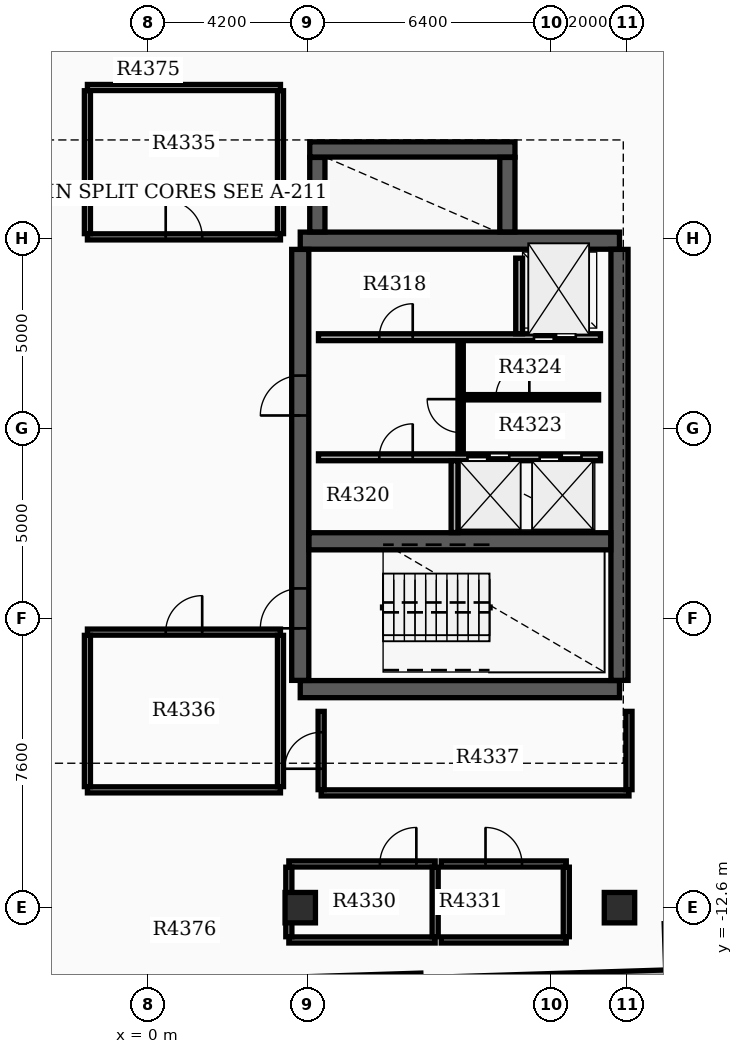
"""IFC4 building model, lengths in metres.
Left out: names, types, materials, properties, quantities, classifications, styles, units other than length and angle.
Written with IfcOpenShell. Run it as: python <this file> out.ifc"""

import sys

from ifc_helpers import new_model, si_unit, direction, frame, frame_2d, origin, origin_2d, place, context, subcontext, project, spatial, rectangle, extrude, element, fill, save


model = new_model("IFC4")
c1 = context("Model", 3, precision=1e-05, world=origin(), true_north=direction((0.0, 1.0)))
c2 = subcontext(c1, "Body", "Model", "MODEL_VIEW")
j1 = project(units=[si_unit("LENGTHUNIT", "METRE"), si_unit("PLANEANGLEUNIT", "RADIAN")], contexts=[c1])
p1 = place(None, origin())
s1 = spatial("IfcSite", under=j1, at=p1, CompositionType="ELEMENT")
p2 = place(p1, origin())
s2 = spatial("IfcBuilding", under=s1, at=p2, CompositionType="ELEMENT")
p3 = place(p2, frame((0.0, 0.0, 273.3)))
s3 = spatial("IfcBuildingStorey", under=s2, at=p3, CompositionType="ELEMENT", Elevation=273.3)
for number, where, z_axis, x_axis in (
    (1, (4.0, -6.85, 0.0), (0.0, 0.0, 1.0), (1.0, 0.0, 0.0)),
    (2, (4.0, 4.95, 0.0), (0.0, 0.0, 1.0), (1.0, 0.0, 0.0)),
):
    element("IfcWall", number, at=place(p3, frame(where, z_axis=z_axis, x_axis=x_axis)), inside=s3, PredefinedType="SHEAR", context=c2, shape_type="SweptSolid", body=[
        extrude(rectangle(XDim=8.4, YDim=0.45, at=frame_2d((4.2, 0.0))), origin(), (0.0, 0.0, 1.0), 3.7),
    ])
p4 = place(p3, frame((4.0, -6.62, 0.0), z_axis=(0.0, 0.0, 1.0), x_axis=(0.0, 1.0, 0.0)))
e3 = element("IfcWall", 3, at=p4, inside=s3, PredefinedType="SHEAR", context=c2, shape_type="SweptSolid", body=[
    extrude(rectangle(XDim=11.34, YDim=0.45, at=frame_2d((5.67, 0.0))), origin(), (0.0, 0.0, 1.0), 3.7),
])
p5 = place(p4, frame((1.37, 0.0, 0.0)))
e4 = element("IfcOpeningElement", 4, at=p5, cuts=e3, PredefinedType="OPENING", context=c2, shape_type="SweptSolid", body=[
    extrude(rectangle(XDim=1.05, YDim=2.15, at=frame_2d((0.525, 1.075))), frame((0.0, 0.235, 0.0), z_axis=(0.0, -1.0, 0.0), x_axis=(1.0, 0.0, 0.0)), (0.0, 0.0, 1.0), 0.47),
])
p6 = place(p4, frame((6.97, 0.0, 0.0)))
e5 = element("IfcOpeningElement", 5, at=p6, cuts=e3, PredefinedType="OPENING", context=c2, shape_type="SweptSolid", body=[
    extrude(rectangle(XDim=1.05, YDim=2.15, at=frame_2d((0.525, 1.075))), frame((0.0, 0.235, 0.0), z_axis=(0.0, -1.0, 0.0), x_axis=(1.0, 0.0, 0.0)), (0.0, 0.0, 1.0), 0.47),
])
p7 = place(p3, frame((12.4, -6.62, 0.0), z_axis=(0.0, 0.0, 1.0), x_axis=(0.0, 1.0, 0.0)))
e6 = element("IfcWall", 6, at=p7, inside=s3, PredefinedType="SHEAR", context=c2, shape_type="SweptSolid", body=[
    extrude(rectangle(XDim=11.34, YDim=0.45, at=frame_2d((5.67, 0.0))), origin(), (0.0, 0.0, 1.0), 3.7),
])
p8 = place(p3, frame((4.23, -2.96, 0.0), z_axis=(0.0, 0.0, 1.0), x_axis=(1.0, 0.0, 0.0)))
e7 = element("IfcWall", 7, at=p8, inside=s3, PredefinedType="SHEAR", context=c2, shape_type="SweptSolid", body=[
    extrude(rectangle(XDim=7.94, YDim=0.45, at=frame_2d((3.97, 0.0))), origin(), (0.0, 0.0, 1.0), 3.7),
])
p9 = place(p3, frame((4.45, 5.18, 0.0), z_axis=(0.0, 0.0, 1.0), x_axis=(0.0, 1.0, 0.0)))
e8 = element("IfcWall", 8, at=p9, inside=s3, PredefinedType="SHEAR", context=c2, shape_type="SweptSolid", body=[
    extrude(rectangle(XDim=1.96, YDim=0.4, at=frame_2d((0.98, 0.0))), origin(), (0.0, 0.0, 1.0), 3.7),
])
p10 = place(p3, frame((4.25, 7.35, 0.0), z_axis=(0.0, 0.0, 1.0), x_axis=(1.0, 0.0, 0.0)))
e9 = element("IfcWall", 9, at=p10, inside=s3, PredefinedType="SHEAR", context=c2, shape_type="SweptSolid", body=[
    extrude(rectangle(XDim=5.4, YDim=0.4, at=frame_2d((2.7, 0.0))), origin(), (0.0, 0.0, 1.0), 3.7),
])
p11 = place(p3, frame((9.45, 5.18, 0.0), z_axis=(0.0, 0.0, 1.0), x_axis=(0.0, 1.0, 0.0)))
e10 = element("IfcWall", 10, at=p11, inside=s3, PredefinedType="SHEAR", context=c2, shape_type="SweptSolid", body=[
    extrude(rectangle(XDim=1.96, YDim=0.4, at=frame_2d((0.98, 0.0))), origin(), (0.0, 0.0, 1.0), 3.7),
])
for number, where, z_axis, x_axis in (
    (11, (12.4, -12.6, 0.0), (0.0, 0.0, 1.0), (1.0, 0.0, 0.0)),
    (12, (4.0, -12.6, 0.0), (0.0, 0.0, 1.0), (1.0, 0.0, 0.0)),
):
    element("IfcColumn", number, at=place(p3, frame(where, z_axis=z_axis, x_axis=x_axis)), inside=s3, PredefinedType="COLUMN", context=c2, shape_type="SweptSolid", body=[
        extrude(rectangle(XDim=0.8, YDim=0.8, at=origin_2d()), origin(), (0.0, 0.0, 1.0), 3.9),
    ])
p12 = place(p3, frame((13.618, -14.379, 0.0), z_axis=(0.0, 0.0, 1.0), x_axis=(-0.999507224741, -0.031389611199, 0.0)))
e13 = element("IfcWall", 13, at=p12, inside=s3, PredefinedType="STANDARD", context=c2, shape_type="SweptSolid", body=[
    extrude(rectangle(XDim=6.3, YDim=0.28, at=frame_2d((3.15, 0.0))), origin(), (0.0, 0.0, 1.0), 3.18),
])
p13 = place(p3, frame((4.48, 2.41, 0.0), z_axis=(0.0, 0.0, 1.0), x_axis=(1.0, 0.0, 0.0)))
e14 = element("IfcWall", 14, at=p13, inside=s3, PredefinedType="SOLIDWALL", context=c2, shape_type="SweptSolid", body=[
    extrude(rectangle(XDim=7.42, YDim=0.18, at=frame_2d((3.71, 0.0))), origin(), (0.0, 0.0, 1.0), 3.17),
])
p14 = place(p13, frame((5.67, 0.0, 0.0)))
e15 = element("IfcOpeningElement", 15, at=p14, cuts=e14, PredefinedType="OPENING", context=c2, shape_type="SweptSolid", body=[
    extrude(rectangle(XDim=1.1, YDim=2.15, at=frame_2d((0.55, 1.075))), frame((0.0, 0.1, 0.0), z_axis=(0.0, -1.0, 0.0), x_axis=(1.0, 0.0, 0.0)), (0.0, 0.0, 1.0), 0.2),
])
p15 = place(p13, frame((1.6, 0.0, 0.0)))
e16 = element("IfcOpeningElement", 16, at=p15, cuts=e14, PredefinedType="OPENING", context=c2, shape_type="SweptSolid", body=[
    extrude(rectangle(XDim=0.88, YDim=2.1, at=frame_2d((0.44, 1.05))), frame((0.0, 0.1, 0.0), z_axis=(0.0, -1.0, 0.0), x_axis=(1.0, 0.0, 0.0)), (0.0, 0.0, 1.0), 0.2),
])
p16 = place(p3, frame((4.48, -0.75, 0.0), z_axis=(0.0, 0.0, 1.0), x_axis=(1.0, 0.0, 0.0)))
e17 = element("IfcWall", 17, at=p16, inside=s3, PredefinedType="SOLIDWALL", context=c2, shape_type="SweptSolid", body=[
    extrude(rectangle(XDim=7.42, YDim=0.18, at=frame_2d((3.71, 0.0))), origin(), (0.0, 0.0, 1.0), 3.17),
])
p17 = place(p16, frame((3.92, 0.0, 0.0)))
e18 = element("IfcOpeningElement", 18, at=p17, cuts=e17, PredefinedType="OPENING", context=c2, shape_type="SweptSolid", body=[
    extrude(rectangle(XDim=1.1, YDim=2.15, at=frame_2d((0.55, 1.075))), frame((0.0, 0.1, 0.0), z_axis=(0.0, -1.0, 0.0), x_axis=(1.0, 0.0, 0.0)), (0.0, 0.0, 1.0), 0.2),
])
p18 = place(p16, frame((5.82, 0.0, 0.0)))
e19 = element("IfcOpeningElement", 19, at=p18, cuts=e17, PredefinedType="OPENING", context=c2, shape_type="SweptSolid", body=[
    extrude(rectangle(XDim=1.1, YDim=2.15, at=frame_2d((0.55, 1.075))), frame((0.0, 0.1, 0.0), z_axis=(0.0, -1.0, 0.0), x_axis=(1.0, 0.0, 0.0)), (0.0, 0.0, 1.0), 0.2),
])
p19 = place(p16, frame((1.6, 0.0, 0.0)))
e20 = element("IfcOpeningElement", 20, at=p19, cuts=e17, PredefinedType="OPENING", context=c2, shape_type="SweptSolid", body=[
    extrude(rectangle(XDim=0.88, YDim=2.1, at=frame_2d((0.44, 1.05))), frame((0.0, 0.1, 0.0), z_axis=(0.0, -1.0, 0.0), x_axis=(1.0, 0.0, 0.0)), (0.0, 0.0, 1.0), 0.2),
])
p20 = place(p3, frame((9.76, 2.5, 0.0), z_axis=(0.0, 0.0, 1.0), x_axis=(0.0, 1.0, 0.0)))
e21 = element("IfcWall", 21, at=p20, inside=s3, PredefinedType="SOLIDWALL", context=c2, shape_type="SweptSolid", body=[
    extrude(rectangle(XDim=1.99, YDim=0.18, at=frame_2d((0.995, 0.0))), origin(), (0.0, 0.0, 1.0), 3.17),
])
p21 = place(p3, frame((8.06, -2.73, 0.0), z_axis=(0.0, 0.0, 1.0), x_axis=(0.0, 1.0, 0.0)))
e22 = element("IfcWall", 22, at=p21, inside=s3, PredefinedType="SOLIDWALL", context=c2, shape_type="SweptSolid", body=[
    extrude(rectangle(XDim=1.89, YDim=0.18, at=frame_2d((0.945, 0.0))), origin(), (0.0, 0.0, 1.0), 3.17),
])
p22 = place(p3, frame((8.22, -0.65, 0.0), z_axis=(0.0, 0.0, 1.0), x_axis=(0.0, 1.0, 0.0)))
e23 = element("IfcWall", 23, at=p22, inside=s3, PredefinedType="SOLIDWALL", context=c2, shape_type="SweptSolid", body=[
    extrude(rectangle(XDim=2.96, YDim=0.14, at=frame_2d((1.48, 0.0))), origin(), (0.0, 0.0, 1.0), 3.17),
])
p23 = place(p22, frame((0.55, 0.0, 0.0)))
e24 = element("IfcOpeningElement", 24, at=p23, cuts=e23, PredefinedType="OPENING", context=c2, shape_type="SweptSolid", body=[
    extrude(rectangle(XDim=0.88, YDim=2.1, at=frame_2d((0.44, 1.05))), frame((0.0, 0.08, 0.0), z_axis=(0.0, -1.0, 0.0), x_axis=(1.0, 0.0, 0.0)), (0.0, 0.0, 1.0), 0.16),
])
p24 = place(p3, frame((8.298, 0.83, 0.0), z_axis=(0.0, 0.0, 1.0), x_axis=(1.0, 0.0, 0.0)))
e25 = element("IfcWall", 25, at=p24, inside=s3, PredefinedType="PARTITIONING", context=c2, shape_type="SweptSolid", body=[
    extrude(rectangle(XDim=3.552, YDim=0.14, at=frame_2d((1.776, 0.0))), origin(), (0.0, 0.0, 1.0), 3.17),
])
p25 = place(p24, frame((0.85, 0.0, 0.0)))
e26 = element("IfcOpeningElement", 26, at=p25, cuts=e25, PredefinedType="OPENING", context=c2, shape_type="SweptSolid", body=[
    extrude(rectangle(XDim=0.88, YDim=2.1, at=frame_2d((0.44, 1.05))), frame((0.0, 0.08, 0.0), z_axis=(0.0, -1.0, 0.0), x_axis=(1.0, 0.0, 0.0)), (0.0, 0.0, 1.0), 0.16),
])
p26 = place(p3, frame((3.7, -13.45, 0.0), z_axis=(0.0, 0.0, 1.0), x_axis=(1.0, 0.0, 0.0)))
e27 = element("IfcWall", 27, at=p26, inside=s3, PredefinedType="PARTITIONING", context=c2, shape_type="SweptSolid", body=[
    extrude(rectangle(XDim=3.85, YDim=0.16, at=frame_2d((1.925, 0.0))), origin(), (0.0, 0.0, 1.0), 3.17),
])
p27 = place(p3, frame((3.7, -11.45, 0.0), z_axis=(0.0, 0.0, 1.0), x_axis=(1.0, 0.0, 0.0)))
e28 = element("IfcWall", 28, at=p27, inside=s3, PredefinedType="PARTITIONING", context=c2, shape_type="SweptSolid", body=[
    extrude(rectangle(XDim=3.85, YDim=0.16, at=frame_2d((1.925, 0.0))), origin(), (0.0, 0.0, 1.0), 3.17),
])
p28 = place(p27, frame((2.395, 0.0, 0.0)))
e29 = element("IfcOpeningElement", 29, at=p28, cuts=e28, PredefinedType="OPENING", context=c2, shape_type="SweptSolid", body=[
    extrude(rectangle(XDim=0.96, YDim=2.15, at=frame_2d((0.48, 1.075))), frame((0.0, 0.09, 0.0), z_axis=(0.0, -1.0, 0.0), x_axis=(1.0, 0.0, 0.0)), (0.0, 0.0, 1.0), 0.18),
])
for number, where, z_axis, x_axis in (
    (30, (3.7, -13.365, 0.0), (0.0, 0.0, 1.0), (0.0, 1.0, 0.0)),
    (31, (7.55, -13.365, 0.0), (0.0, 0.0, 1.0), (0.0, 1.0, 0.0)),
):
    element("IfcWall", number, at=place(p3, frame(where, z_axis=z_axis, x_axis=x_axis)), inside=s3, PredefinedType="PARTITIONING", context=c2, shape_type="SweptSolid", body=[
        extrude(rectangle(XDim=1.83, YDim=0.16, at=frame_2d((0.915, 0.0))), origin(), (0.0, 0.0, 1.0), 3.17),
    ])
p29 = place(p3, frame((7.71, -13.45, 0.0), z_axis=(0.0, 0.0, 1.0), x_axis=(1.0, 0.0, 0.0)))
e32 = element("IfcWall", 32, at=p29, inside=s3, PredefinedType="PARTITIONING", context=c2, shape_type="SweptSolid", body=[
    extrude(rectangle(XDim=3.29, YDim=0.16, at=frame_2d((1.645, 0.0))), origin(), (0.0, 0.0, 1.0), 3.17),
])
p30 = place(p3, frame((7.71, -11.45, 0.0), z_axis=(0.0, 0.0, 1.0), x_axis=(1.0, 0.0, 0.0)))
e33 = element("IfcWall", 33, at=p30, inside=s3, PredefinedType="PARTITIONING", context=c2, shape_type="SweptSolid", body=[
    extrude(rectangle(XDim=3.29, YDim=0.16, at=frame_2d((1.645, 0.0))), origin(), (0.0, 0.0, 1.0), 3.17),
])
p31 = place(p30, frame((1.165, 0.0, 0.0)))
e34 = element("IfcOpeningElement", 34, at=p31, cuts=e33, PredefinedType="OPENING", context=c2, shape_type="SweptSolid", body=[
    extrude(rectangle(XDim=0.96, YDim=2.15, at=frame_2d((0.48, 1.075))), frame((0.0, 0.09, 0.0), z_axis=(0.0, -1.0, 0.0), x_axis=(1.0, 0.0, 0.0)), (0.0, 0.0, 1.0), 0.18),
])
p32 = place(p3, frame((11.0, -13.365, 0.0), z_axis=(0.0, 0.0, 1.0), x_axis=(0.0, 1.0, 0.0)))
e35 = element("IfcWall", 35, at=p32, inside=s3, PredefinedType="PARTITIONING", context=c2, shape_type="SweptSolid", body=[
    extrude(rectangle(XDim=1.83, YDim=0.16, at=frame_2d((0.915, 0.0))), origin(), (0.0, 0.0, 1.0), 3.17),
])
p33 = place(p3, frame((-1.6, 5.05, 0.0), z_axis=(0.0, 0.0, 1.0), x_axis=(1.0, 0.0, 0.0)))
e36 = element("IfcWall", 36, at=p33, inside=s3, PredefinedType="PARTITIONING", context=c2, shape_type="SweptSolid", body=[
    extrude(rectangle(XDim=5.08, YDim=0.16, at=frame_2d((2.54, 0.0))), origin(), (0.0, 0.0, 1.0), 3.17),
])
p34 = place(p33, frame((2.06, 0.0, 0.0)))
e37 = element("IfcOpeningElement", 37, at=p34, cuts=e36, PredefinedType="OPENING", context=c2, shape_type="SweptSolid", body=[
    extrude(rectangle(XDim=0.96, YDim=2.15, at=frame_2d((0.48, 1.075))), frame((0.0, 0.09, 0.0), z_axis=(0.0, -1.0, 0.0), x_axis=(1.0, 0.0, 0.0)), (0.0, 0.0, 1.0), 0.18),
])
p35 = place(p3, frame((-1.6, 8.98, 0.0), z_axis=(0.0, 0.0, 1.0), x_axis=(1.0, 0.0, 0.0)))
e38 = element("IfcWall", 38, at=p35, inside=s3, PredefinedType="PARTITIONING", context=c2, shape_type="SweptSolid", body=[
    extrude(rectangle(XDim=5.08, YDim=0.16, at=frame_2d((2.54, 0.0))), origin(), (0.0, 0.0, 1.0), 3.17),
])
for number, where, z_axis, x_axis in (
    (39, (-1.6, 5.135, 0.0), (0.0, 0.0, 1.0), (0.0, 1.0, 0.0)),
    (40, (3.48, 5.135, 0.0), (0.0, 0.0, 1.0), (0.0, 1.0, 0.0)),
):
    element("IfcWall", number, at=place(p3, frame(where, z_axis=z_axis, x_axis=x_axis)), inside=s3, PredefinedType="PARTITIONING", context=c2, shape_type="SweptSolid", body=[
        extrude(rectangle(XDim=3.76, YDim=0.16, at=frame_2d((1.88, 0.0))), origin(), (0.0, 0.0, 1.0), 3.17),
    ])
p36 = place(p3, frame((-1.6, -9.5, 0.0), z_axis=(0.0, 0.0, 1.0), x_axis=(1.0, 0.0, 0.0)))
e41 = element("IfcWall", 41, at=p36, inside=s3, PredefinedType="PARTITIONING", context=c2, shape_type="SweptSolid", body=[
    extrude(rectangle(XDim=5.08, YDim=0.16, at=frame_2d((2.54, 0.0))), origin(), (0.0, 0.0, 1.0), 3.17),
])
p37 = place(p3, frame((-1.6, -5.35, 0.0), z_axis=(0.0, 0.0, 1.0), x_axis=(1.0, 0.0, 0.0)))
e42 = element("IfcWall", 42, at=p37, inside=s3, PredefinedType="PARTITIONING", context=c2, shape_type="SweptSolid", body=[
    extrude(rectangle(XDim=5.08, YDim=0.16, at=frame_2d((2.54, 0.0))), origin(), (0.0, 0.0, 1.0), 3.17),
])
p38 = place(p37, frame((2.06, 0.0, 0.0)))
e43 = element("IfcOpeningElement", 43, at=p38, cuts=e42, PredefinedType="OPENING", context=c2, shape_type="SweptSolid", body=[
    extrude(rectangle(XDim=0.96, YDim=2.15, at=frame_2d((0.48, 1.075))), frame((0.0, 0.09, 0.0), z_axis=(0.0, -1.0, 0.0), x_axis=(1.0, 0.0, 0.0)), (0.0, 0.0, 1.0), 0.18),
])
for number, where, z_axis, x_axis in (
    (44, (-1.6, -9.415, 0.0), (0.0, 0.0, 1.0), (0.0, 1.0, 0.0)),
    (45, (3.48, -9.415, 0.0), (0.0, 0.0, 1.0), (0.0, 1.0, 0.0)),
):
    element("IfcWall", number, at=place(p3, frame(where, z_axis=z_axis, x_axis=x_axis)), inside=s3, PredefinedType="PARTITIONING", context=c2, shape_type="SweptSolid", body=[
        extrude(rectangle(XDim=3.98, YDim=0.16, at=frame_2d((1.99, 0.0))), origin(), (0.0, 0.0, 1.0), 3.17),
    ])
p39 = place(p3, frame((4.55, -9.58, 0.0), z_axis=(0.0, 0.0, 1.0), x_axis=(1.0, 0.0, 0.0)))
e46 = element("IfcWall", 46, at=p39, inside=s3, PredefinedType="PARTITIONING", context=c2, shape_type="SweptSolid", body=[
    extrude(rectangle(XDim=8.1, YDim=0.16, at=frame_2d((4.05, 0.0))), origin(), (0.0, 0.0, 1.0), 3.17),
])
p40 = place(p3, frame((4.55, -9.495, 0.0), z_axis=(0.0, 0.0, 1.0), x_axis=(0.0, 1.0, 0.0)))
e47 = element("IfcWall", 47, at=p40, inside=s3, PredefinedType="PARTITIONING", context=c2, shape_type="SweptSolid", body=[
    extrude(rectangle(XDim=2.06, YDim=0.16, at=frame_2d((1.03, 0.0))), origin(), (0.0, 0.0, 1.0), 3.17),
])
p41 = place(p40, frame((0.55, 0.0, 0.0)))
e48 = element("IfcOpeningElement", 48, at=p41, cuts=e47, PredefinedType="OPENING", context=c2, shape_type="SweptSolid", body=[
    extrude(rectangle(XDim=0.96, YDim=2.15, at=frame_2d((0.48, 1.075))), frame((0.0, 0.09, 0.0), z_axis=(0.0, -1.0, 0.0), x_axis=(1.0, 0.0, 0.0)), (0.0, 0.0, 1.0), 0.18),
])
p42 = place(p3, frame((12.65, -9.495, 0.0), z_axis=(0.0, 0.0, 1.0), x_axis=(0.0, 1.0, 0.0)))
e49 = element("IfcWall", 49, at=p42, inside=s3, PredefinedType="PARTITIONING", context=c2, shape_type="SweptSolid", body=[
    extrude(rectangle(XDim=2.06, YDim=0.16, at=frame_2d((1.03, 0.0))), origin(), (0.0, 0.0, 1.0), 3.17),
])
p43 = place(p3, frame((1.659, -14.575, 0.0), z_axis=(0.0, 0.0, 1.0), x_axis=(0.999505408206, 0.031447400002, 0.0)))
e50 = element("IfcWall", 50, at=p43, inside=s3, PredefinedType="PARTITIONING", context=c2, shape_type="SweptSolid", body=[
    extrude(rectangle(XDim=5.52, YDim=0.16, at=frame_2d((2.76, 0.0))), origin(), (0.0, 0.0, 1.0), 3.17),
])
p44 = place(p5, origin())
e51 = element("IfcDoor", 51, at=p44, inside=s3, OperationType="SINGLE_SWING_LEFT", PredefinedType="DOOR", context=c2, shape_type="SweptSolid", body=[
    extrude(rectangle(XDim=1.05, YDim=2.15, at=frame_2d((0.525, 1.075))), frame((0.0, 0.025, 0.0), z_axis=(0.0, -1.0, 0.0), x_axis=(1.0, 0.0, 0.0)), (0.0, 0.0, 1.0), 0.05),
])
fill(e4, e51)
p45 = place(p6, origin())
e52 = element("IfcDoor", 52, at=p45, inside=s3, OperationType="SINGLE_SWING_LEFT", PredefinedType="DOOR", context=c2, shape_type="SweptSolid", body=[
    extrude(rectangle(XDim=1.05, YDim=2.15, at=frame_2d((0.525, 1.075))), frame((0.0, 0.025, 0.0), z_axis=(0.0, -1.0, 0.0), x_axis=(1.0, 0.0, 0.0)), (0.0, 0.0, 1.0), 0.05),
])
fill(e5, e52)
p46 = place(p14, origin())
e53 = element("IfcDoor", 53, at=p46, inside=s3, OperationType="DOUBLE_DOOR_SLIDING", PredefinedType="DOOR", context=c2, shape_type="SweptSolid", body=[
    extrude(rectangle(XDim=1.1, YDim=2.15, at=frame_2d((0.55, 1.075))), frame((0.0, 0.025, 0.0), z_axis=(0.0, -1.0, 0.0), x_axis=(1.0, 0.0, 0.0)), (0.0, 0.0, 1.0), 0.05),
])
fill(e15, e53)
p47 = place(p17, origin())
e54 = element("IfcDoor", 54, at=p47, inside=s3, OperationType="DOUBLE_DOOR_SLIDING", PredefinedType="DOOR", context=c2, shape_type="SweptSolid", body=[
    extrude(rectangle(XDim=1.1, YDim=2.15, at=frame_2d((0.55, 1.075))), frame((0.0, 0.025, 0.0), z_axis=(0.0, -1.0, 0.0), x_axis=(1.0, 0.0, 0.0)), (0.0, 0.0, 1.0), 0.05),
])
fill(e18, e54)
p48 = place(p18, origin())
e55 = element("IfcDoor", 55, at=p48, inside=s3, OperationType="DOUBLE_DOOR_SLIDING", PredefinedType="DOOR", context=c2, shape_type="SweptSolid", body=[
    extrude(rectangle(XDim=1.1, YDim=2.15, at=frame_2d((0.55, 1.075))), frame((0.0, 0.025, 0.0), z_axis=(0.0, -1.0, 0.0), x_axis=(1.0, 0.0, 0.0)), (0.0, 0.0, 1.0), 0.05),
])
fill(e19, e55)
p49 = place(p15, origin())
e56 = element("IfcDoor", 56, at=p49, inside=s3, OperationType="SINGLE_SWING_RIGHT", PredefinedType="DOOR", context=c2, shape_type="SweptSolid", body=[
    extrude(rectangle(XDim=0.88, YDim=2.1, at=frame_2d((0.44, 1.05))), frame((0.0, 0.025, 0.0), z_axis=(0.0, -1.0, 0.0), x_axis=(1.0, 0.0, 0.0)), (0.0, 0.0, 1.0), 0.05),
])
fill(e16, e56)
p50 = place(p19, origin())
e57 = element("IfcDoor", 57, at=p50, inside=s3, OperationType="SINGLE_SWING_RIGHT", PredefinedType="DOOR", context=c2, shape_type="SweptSolid", body=[
    extrude(rectangle(XDim=0.88, YDim=2.1, at=frame_2d((0.44, 1.05))), frame((0.0, 0.025, 0.0), z_axis=(0.0, -1.0, 0.0), x_axis=(1.0, 0.0, 0.0)), (0.0, 0.0, 1.0), 0.05),
])
fill(e20, e57)
p51 = place(p23, origin())
e58 = element("IfcDoor", 58, at=p51, inside=s3, OperationType="SINGLE_SWING_RIGHT", PredefinedType="DOOR", context=c2, shape_type="SweptSolid", body=[
    extrude(rectangle(XDim=0.88, YDim=2.1, at=frame_2d((0.44, 1.05))), frame((0.0, 0.025, 0.0), z_axis=(0.0, -1.0, 0.0), x_axis=(1.0, 0.0, 0.0)), (0.0, 0.0, 1.0), 0.05),
])
fill(e24, e58)
p52 = place(p25, origin())
e59 = element("IfcDoor", 59, at=p52, inside=s3, OperationType="SINGLE_SWING_RIGHT", PredefinedType="DOOR", context=c2, shape_type="SweptSolid", body=[
    extrude(rectangle(XDim=0.88, YDim=2.1, at=frame_2d((0.44, 1.05))), frame((0.0, 0.025, 0.0), z_axis=(0.0, -1.0, 0.0), x_axis=(1.0, 0.0, 0.0)), (0.0, 0.0, 1.0), 0.05),
])
fill(e26, e59)
p53 = place(p28, origin())
e60 = element("IfcDoor", 60, at=p53, inside=s3, OperationType="SINGLE_SWING_RIGHT", PredefinedType="DOOR", context=c2, shape_type="SweptSolid", body=[
    extrude(rectangle(XDim=0.96, YDim=2.15, at=frame_2d((0.48, 1.075))), frame((0.0, 0.025, 0.0), z_axis=(0.0, -1.0, 0.0), x_axis=(1.0, 0.0, 0.0)), (0.0, 0.0, 1.0), 0.05),
])
fill(e29, e60)
p54 = place(p31, origin())
e61 = element("IfcDoor", 61, at=p54, inside=s3, OperationType="SINGLE_SWING_LEFT", PredefinedType="DOOR", context=c2, shape_type="SweptSolid", body=[
    extrude(rectangle(XDim=0.96, YDim=2.15, at=frame_2d((0.48, 1.075))), frame((0.0, 0.025, 0.0), z_axis=(0.0, -1.0, 0.0), x_axis=(1.0, 0.0, 0.0)), (0.0, 0.0, 1.0), 0.05),
])
fill(e34, e61)
p55 = place(p34, origin())
e62 = element("IfcDoor", 62, at=p55, inside=s3, OperationType="SINGLE_SWING_LEFT", PredefinedType="DOOR", context=c2, shape_type="SweptSolid", body=[
    extrude(rectangle(XDim=0.96, YDim=2.15, at=frame_2d((0.48, 1.075))), frame((0.0, 0.025, 0.0), z_axis=(0.0, -1.0, 0.0), x_axis=(1.0, 0.0, 0.0)), (0.0, 0.0, 1.0), 0.05),
])
fill(e37, e62)
p56 = place(p38, origin())
e63 = element("IfcDoor", 63, at=p56, inside=s3, OperationType="SINGLE_SWING_RIGHT", PredefinedType="DOOR", context=c2, shape_type="SweptSolid", body=[
    extrude(rectangle(XDim=0.96, YDim=2.15, at=frame_2d((0.48, 1.075))), frame((0.0, 0.025, 0.0), z_axis=(0.0, -1.0, 0.0), x_axis=(1.0, 0.0, 0.0)), (0.0, 0.0, 1.0), 0.05),
])
fill(e43, e63)
p57 = place(p41, origin())
e64 = element("IfcDoor", 64, at=p57, inside=s3, OperationType="SINGLE_SWING_LEFT", PredefinedType="DOOR", context=c2, shape_type="SweptSolid", body=[
    extrude(rectangle(XDim=0.96, YDim=2.15, at=frame_2d((0.48, 1.075))), frame((0.0, 0.025, 0.0), z_axis=(0.0, -1.0, 0.0), x_axis=(1.0, 0.0, 0.0)), (0.0, 0.0, 1.0), 0.05),
])
fill(e48, e64)
save(model, sys.argv[1])
